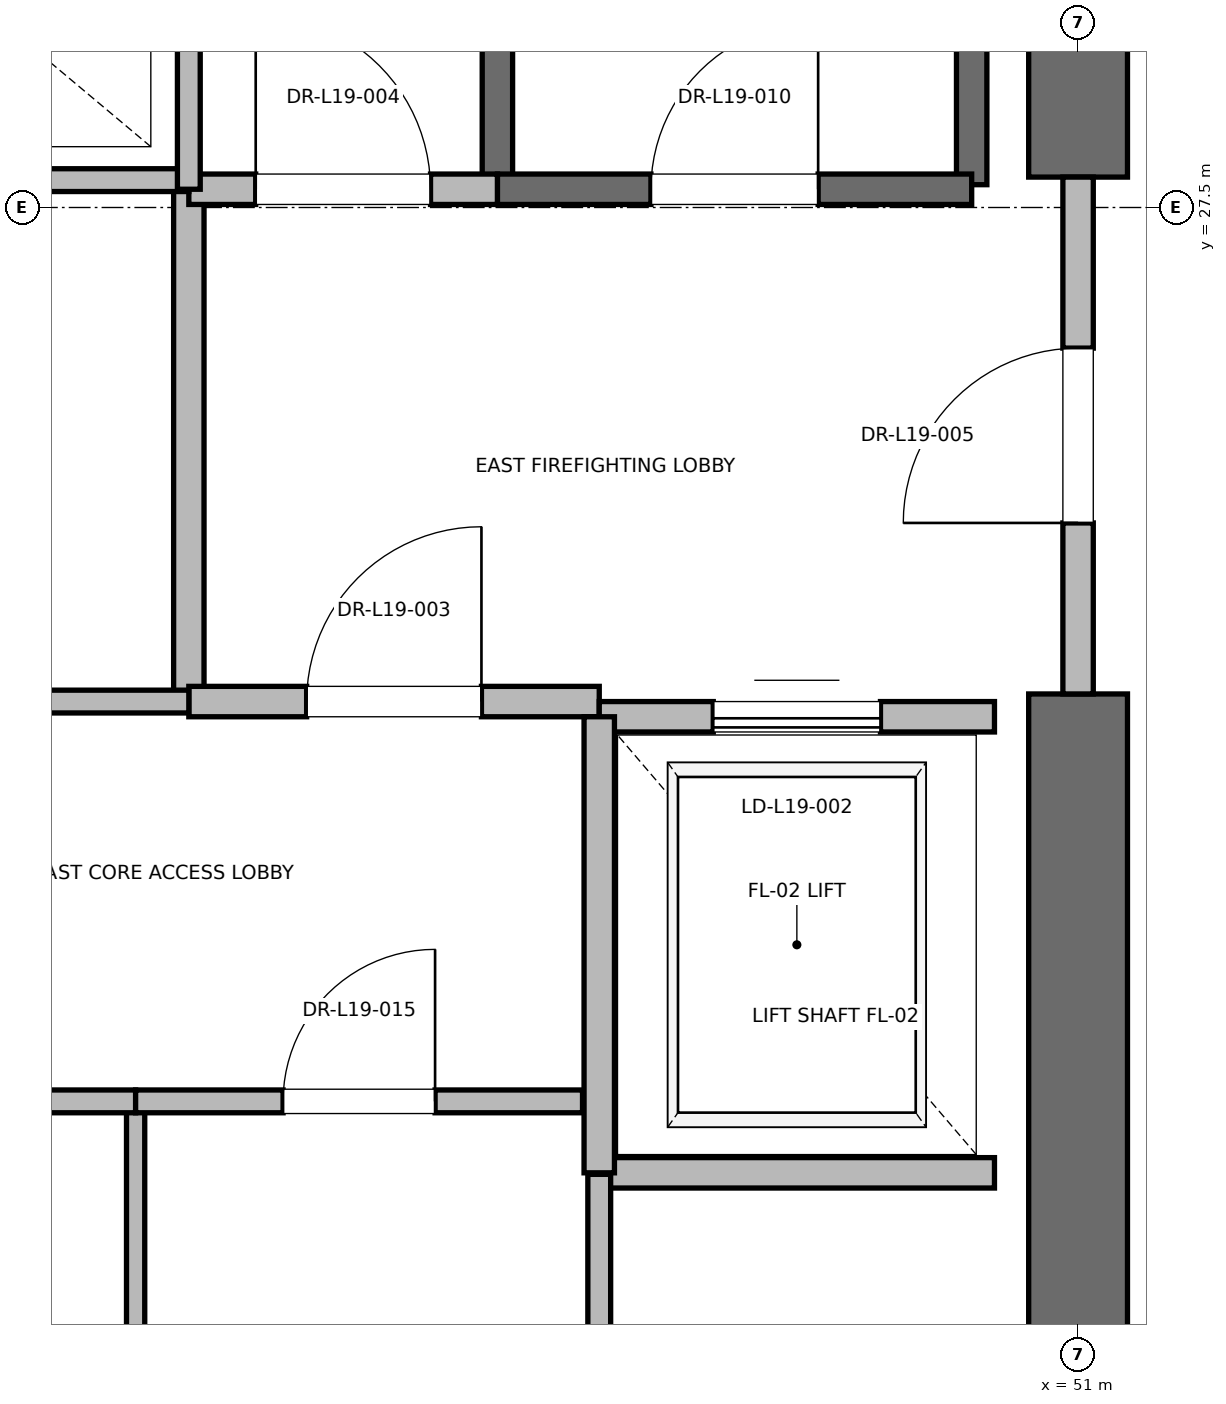
"""IFC4 building model, lengths in metres.
Left out: names, types, materials, properties, quantities, classifications, styles, units other than length and angle.
Written with IfcOpenShell. Run it as: python <this file> out.ifc"""

import sys

from ifc_helpers import new_model, si_unit, direction, frame, frame_2d, origin, place, context, subcontext, project, spatial, rectangle, extrude, element, fill, save


model = new_model("IFC4")
c1 = context("Model", 3, precision=1e-05, world=origin(), true_north=direction((0.0, 1.0)))
c2 = subcontext(c1, "Body", "Model", "MODEL_VIEW")
j1 = project(units=[si_unit("LENGTHUNIT", "METRE"), si_unit("PLANEANGLEUNIT", "RADIAN")], contexts=[c1])
p1 = place(None, origin())
s1 = spatial("IfcSite", under=j1, at=p1, CompositionType="ELEMENT")
p2 = place(p1, origin())
s2 = spatial("IfcBuilding", under=s1, at=p2, CompositionType="ELEMENT")
p3 = place(p2, frame((0.0, 0.0, 83.6)))
s3 = spatial("IfcBuildingStorey", under=s2, at=p3, CompositionType="ELEMENT", Elevation=83.6)
p4 = place(p3, frame((51.0, 18.5, 0.0), z_axis=(0.0, 0.0, 1.0), x_axis=(0.0, 1.0, 0.0)))
e1 = element("IfcWall", 1, at=p4, inside=s3, PredefinedType="SHEAR", context=c2, shape_type="SweptSolid", body=[
    extrude(rectangle(XDim=5.8, YDim=0.65, at=frame_2d((2.9, 0.0))), origin(), (0.0, 0.0, 1.0), 3.76),
])
p5 = place(p3, frame((51.0, 27.7, 0.0), z_axis=(0.0, 0.0, 1.0), x_axis=(0.0, 1.0, 0.0)))
e2 = element("IfcWall", 2, at=p5, inside=s3, PredefinedType="SHEAR", context=c2, shape_type="SweptSolid", body=[
    extrude(rectangle(XDim=8.8, YDim=0.65, at=frame_2d((4.4, 0.0))), origin(), (0.0, 0.0, 1.0), 3.76),
])
p6 = place(p3, frame((50.3, 27.65, 0.0), z_axis=(0.0, 0.0, 1.0), x_axis=(0.0, 1.0, 0.0)))
e3 = element("IfcWall", 3, at=p6, inside=s3, PredefinedType="SOLIDWALL", context=c2, shape_type="SweptSolid", body=[
    extrude(rectangle(XDim=8.15, YDim=0.2, at=frame_2d((4.075, 0.0))), origin(), (0.0, 0.0, 1.0), 3.76),
])
p7 = place(p3, frame((47.18, 27.62, 0.0), z_axis=(0.0, 0.0, 1.0), x_axis=(0.0, 1.0, 0.0)))
e4 = element("IfcWall", 4, at=p7, inside=s3, PredefinedType="SOLIDWALL", context=c2, shape_type="SweptSolid", body=[
    extrude(rectangle(XDim=8.18, YDim=0.2, at=frame_2d((4.09, 0.0))), origin(), (0.0, 0.0, 1.0), 3.76),
])
p8 = place(p3, frame((47.18, 27.62, 0.0), z_axis=(0.0, 0.0, 1.0), x_axis=(1.0, 0.0, 0.0)))
e5 = element("IfcWall", 5, at=p8, inside=s3, PredefinedType="SOLIDWALL", context=c2, shape_type="SweptSolid", body=[
    extrude(rectangle(XDim=3.12, YDim=0.2, at=frame_2d((1.56, 0.0))), origin(), (0.0, 0.0, 1.0), 3.76),
])
p9 = place(p8, frame((1.01, 0.0, 0.0)))
e6 = element("IfcOpeningElement", 6, at=p9, cuts=e5, PredefinedType="OPENING", context=c2, shape_type="SweptSolid", body=[
    extrude(rectangle(XDim=1.1, YDim=2.15, at=frame_2d((0.55, 1.075))), frame((0.0, 0.1, 0.0), z_axis=(0.0, -1.0, 0.0), x_axis=(1.0, 0.0, 0.0)), (0.0, 0.0, 1.0), 0.2),
])
p10 = place(p3, frame((45.15, 24.25, 0.0), z_axis=(0.0, 0.0, 1.0), x_axis=(0.0, 1.0, 0.0)))
e7 = element("IfcWall", 7, at=p10, inside=s3, PredefinedType="PARTITIONING", context=c2, shape_type="SweptSolid", body=[
    extrude(rectangle(XDim=3.37, YDim=0.2, at=frame_2d((1.685, 0.0))), origin(), (0.0, 0.0, 1.0), 3.76),
])
p11 = place(p3, frame((45.15, 24.25, 0.0), z_axis=(0.0, 0.0, 1.0), x_axis=(1.0, 0.0, 0.0)))
e8 = element("IfcWall", 8, at=p11, inside=s3, PredefinedType="PARTITIONING", context=c2, shape_type="SweptSolid", body=[
    extrude(rectangle(XDim=2.7, YDim=0.2, at=frame_2d((1.35, 0.0))), origin(), (0.0, 0.0, 1.0), 3.76),
])
p12 = place(p11, frame((0.775, 0.0, 0.0)))
e9 = element("IfcOpeningElement", 9, at=p12, cuts=e8, PredefinedType="OPENING", context=c2, shape_type="SweptSolid", body=[
    extrude(rectangle(XDim=1.15, YDim=2.2, at=frame_2d((0.575, 1.1))), frame((0.0, 0.1, 0.0), z_axis=(0.0, -1.0, 0.0), x_axis=(1.0, 0.0, 0.0)), (0.0, 0.0, 1.0), 0.2),
])
p13 = place(p3, frame((45.15, 27.62, 0.0), z_axis=(0.0, 0.0, 1.0), x_axis=(1.0, 0.0, 0.0)))
e10 = element("IfcWall", 10, at=p13, inside=s3, PredefinedType="PARTITIONING", context=c2, shape_type="SweptSolid", body=[
    extrude(rectangle(XDim=2.03, YDim=0.2, at=frame_2d((1.015, 0.0))), origin(), (0.0, 0.0, 1.0), 3.76),
])
p14 = place(p13, frame((0.44, 0.0, 0.0)))
e11 = element("IfcOpeningElement", 11, at=p14, cuts=e10, PredefinedType="OPENING", context=c2, shape_type="SweptSolid", body=[
    extrude(rectangle(XDim=1.15, YDim=2.2, at=frame_2d((0.575, 1.1))), frame((0.0, 0.1, 0.0), z_axis=(0.0, -1.0, 0.0), x_axis=(1.0, 0.0, 0.0)), (0.0, 0.0, 1.0), 0.2),
])
p15 = place(p3, frame((51.0, 24.3, 0.0), z_axis=(0.0, 0.0, 1.0), x_axis=(0.0, 1.0, 0.0)))
e12 = element("IfcWall", 12, at=p15, inside=s3, PredefinedType="PARTITIONING", context=c2, shape_type="SweptSolid", body=[
    extrude(rectangle(XDim=3.4, YDim=0.2, at=frame_2d((1.7, 0.0))), origin(), (0.0, 0.0, 1.0), 2.54),
])
p16 = place(p15, frame((1.125, 0.0, 0.0)))
e13 = element("IfcOpeningElement", 13, at=p16, cuts=e12, PredefinedType="OPENING", context=c2, shape_type="SweptSolid", body=[
    extrude(rectangle(XDim=1.15, YDim=2.2, at=frame_2d((0.575, 1.1))), frame((0.0, 0.1, 0.0), z_axis=(0.0, -1.0, 0.0), x_axis=(1.0, 0.0, 0.0)), (0.0, 0.0, 1.0), 0.2),
])
p17 = place(p3, frame((47.85, 21.15, 0.0), z_axis=(0.0, 0.0, 1.0), x_axis=(1.0, 0.0, 0.0)))
e14 = element("IfcWall", 14, at=p17, inside=s3, PredefinedType="SOLIDWALL", context=c2, shape_type="SweptSolid", body=[
    extrude(rectangle(XDim=2.6, YDim=0.2, at=frame_2d((1.3, 0.0))), origin(), (0.0, 0.0, 1.0), 3.76),
])
p18 = place(p3, frame((50.45, 24.15, 0.0), z_axis=(0.0, 0.0, 1.0), x_axis=(-1.0, 0.0, 0.0)))
e15 = element("IfcWall", 15, at=p18, inside=s3, PredefinedType="SOLIDWALL", context=c2, shape_type="SweptSolid", body=[
    extrude(rectangle(XDim=2.6, YDim=0.2, at=frame_2d((1.3, 0.0))), origin(), (0.0, 0.0, 1.0), 2.54),
])
p19 = place(p18, frame((0.75, 0.0, 0.0)))
e16 = element("IfcOpeningElement", 16, at=p19, cuts=e15, PredefinedType="OPENING", context=c2, shape_type="SweptSolid", body=[
    extrude(rectangle(XDim=1.1, YDim=2.2, at=frame_2d((0.55, 1.1))), frame((0.0, 0.1, 0.0), z_axis=(0.0, -1.0, 0.0), x_axis=(1.0, 0.0, 0.0)), (0.0, 0.0, 1.0), 0.2),
])
p20 = place(p3, frame((47.85, 24.15, 0.0), z_axis=(0.0, 0.0, 1.0), x_axis=(0.0, -1.0, 0.0)))
e17 = element("IfcWall", 17, at=p20, inside=s3, PredefinedType="SOLIDWALL", context=c2, shape_type="SweptSolid", body=[
    extrude(rectangle(XDim=3.0, YDim=0.2, at=frame_2d((1.5, 0.0))), origin(), (0.0, 0.0, 1.0), 3.76),
])
p21 = place(p3, frame((41.56, 27.68, 0.0), z_axis=(0.0, 0.0, 1.0), x_axis=(1.0, 0.0, 0.0)))
e18 = element("IfcWall", 18, at=p21, inside=s3, PredefinedType="PARTITIONING", context=c2, shape_type="SweptSolid", body=[
    extrude(rectangle(XDim=3.59, YDim=0.15, at=frame_2d((1.795, 0.0))), origin(), (0.0, 0.0, 1.0), 2.85),
])
p22 = place(p3, frame((47.85, 18.6, 0.0), z_axis=(0.0, 0.0, 1.0), x_axis=(0.0, 1.0, 0.0)))
e19 = element("IfcWall", 19, at=p22, inside=s3, PredefinedType="PARTITIONING", context=c2, shape_type="SweptSolid", body=[
    extrude(rectangle(XDim=2.54, YDim=0.15, at=frame_2d((1.27, 0.0))), origin(), (0.0, 0.0, 1.0), 2.85),
])
p23 = place(p3, frame((44.8, 18.6, 0.0), z_axis=(0.0, 0.0, 1.0), x_axis=(0.0, 1.0, 0.0)))
e20 = element("IfcWall", 20, at=p23, inside=s3, PredefinedType="PARTITIONING", context=c2, shape_type="SweptSolid", body=[
    extrude(rectangle(XDim=3.02, YDim=0.12, at=frame_2d((1.51, 0.0))), origin(), (0.0, 0.0, 1.0), 2.85),
])
p24 = place(p3, frame((41.76, 21.62, 0.0), z_axis=(0.0, 0.0, 1.0), x_axis=(1.0, 0.0, 0.0)))
e21 = element("IfcWall", 21, at=p24, inside=s3, PredefinedType="PARTITIONING", context=c2, shape_type="SweptSolid", body=[
    extrude(rectangle(XDim=3.04, YDim=0.15, at=frame_2d((1.52, 0.0))), origin(), (0.0, 0.0, 1.0), 2.85),
])
p25 = place(p24, frame((1.02, 0.0, 0.0)))
e22 = element("IfcOpeningElement", 22, at=p25, cuts=e21, PredefinedType="OPENING", context=c2, shape_type="SweptSolid", body=[
    extrude(rectangle(XDim=1.0, YDim=2.15, at=frame_2d((0.5, 1.075))), frame((0.0, 0.075, 0.0), z_axis=(0.0, -1.0, 0.0), x_axis=(1.0, 0.0, 0.0)), (0.0, 0.0, 1.0), 0.15),
])
p26 = place(p3, frame((44.8, 21.62, 0.0), z_axis=(0.0, 0.0, 1.0), x_axis=(1.0, 0.0, 0.0)))
e23 = element("IfcWall", 23, at=p26, inside=s3, PredefinedType="PARTITIONING", context=c2, shape_type="SweptSolid", body=[
    extrude(rectangle(XDim=2.94, YDim=0.15, at=frame_2d((1.47, 0.0))), origin(), (0.0, 0.0, 1.0), 2.85),
])
p27 = place(p26, frame((0.97, 0.0, 0.0)))
e24 = element("IfcOpeningElement", 24, at=p27, cuts=e23, PredefinedType="OPENING", context=c2, shape_type="SweptSolid", body=[
    extrude(rectangle(XDim=1.0, YDim=2.15, at=frame_2d((0.5, 1.075))), frame((0.0, 0.075, 0.0), z_axis=(0.0, -1.0, 0.0), x_axis=(1.0, 0.0, 0.0)), (0.0, 0.0, 1.0), 0.15),
])
p28 = place(p3, frame((41.76, 24.25, 0.0), z_axis=(0.0, 0.0, 1.0), x_axis=(1.0, 0.0, 0.0)))
e25 = element("IfcWall", 25, at=p28, inside=s3, PredefinedType="PARTITIONING", context=c2, shape_type="SweptSolid", body=[
    extrude(rectangle(XDim=3.39, YDim=0.15, at=frame_2d((1.695, 0.0))), origin(), (0.0, 0.0, 1.0), 2.85),
])
p29 = place(p28, frame((1.255, 0.0, 0.0)))
e26 = element("IfcOpeningElement", 26, at=p29, cuts=e25, PredefinedType="OPENING", context=c2, shape_type="SweptSolid", body=[
    extrude(rectangle(XDim=0.88, YDim=2.1, at=frame_2d((0.44, 1.05))), frame((0.0, 0.075, 0.0), z_axis=(0.0, -1.0, 0.0), x_axis=(1.0, 0.0, 0.0)), (0.0, 0.0, 1.0), 0.15),
])
p30 = place(p3, frame((45.15, 27.62, 0.0), z_axis=(0.0, 0.0, 1.0), x_axis=(0.0, 1.0, 0.0)))
e27 = element("IfcWall", 27, at=p30, inside=s3, PredefinedType="PARTITIONING", context=c2, shape_type="SweptSolid", body=[
    extrude(rectangle(XDim=3.1, YDim=0.15, at=frame_2d((1.55, 0.0))), origin(), (0.0, 0.0, 1.0), 2.85),
])
p31 = place(p9, origin())
e28 = element("IfcDoor", 28, at=p31, inside=s3, OperationType="SINGLE_SWING_RIGHT", PredefinedType="DOOR", context=c2, shape_type="SweptSolid", body=[
    extrude(rectangle(XDim=1.1, YDim=2.15, at=frame_2d((0.55, 1.075))), frame((0.0, 0.025, 0.0), z_axis=(0.0, -1.0, 0.0), x_axis=(1.0, 0.0, 0.0)), (0.0, 0.0, 1.0), 0.05),
])
fill(e6, e28)
p32 = place(p12, origin())
e29 = element("IfcDoor", 29, at=p32, inside=s3, OperationType="SINGLE_SWING_RIGHT", PredefinedType="DOOR", context=c2, shape_type="SweptSolid", body=[
    extrude(rectangle(XDim=1.15, YDim=2.2, at=frame_2d((0.575, 1.1))), frame((0.0, 0.025, 0.0), z_axis=(0.0, -1.0, 0.0), x_axis=(1.0, 0.0, 0.0)), (0.0, 0.0, 1.0), 0.05),
])
fill(e9, e29)
p33 = place(p14, origin())
e30 = element("IfcDoor", 30, at=p33, inside=s3, OperationType="SINGLE_SWING_LEFT", PredefinedType="DOOR", context=c2, shape_type="SweptSolid", body=[
    extrude(rectangle(XDim=1.15, YDim=2.2, at=frame_2d((0.575, 1.1))), frame((0.0, 0.025, 0.0), z_axis=(0.0, -1.0, 0.0), x_axis=(1.0, 0.0, 0.0)), (0.0, 0.0, 1.0), 0.05),
])
fill(e11, e30)
p34 = place(p16, origin())
e31 = element("IfcDoor", 31, at=p34, inside=s3, OperationType="SINGLE_SWING_LEFT", PredefinedType="DOOR", context=c2, shape_type="SweptSolid", body=[
    extrude(rectangle(XDim=1.15, YDim=2.2, at=frame_2d((0.575, 1.1))), frame((0.0, 0.025, 0.0), z_axis=(0.0, -1.0, 0.0), x_axis=(1.0, 0.0, 0.0)), (0.0, 0.0, 1.0), 0.05),
])
fill(e13, e31)
p35 = place(p19, origin())
e32 = element("IfcDoor", 32, at=p35, inside=s3, OperationType="SLIDING_TO_RIGHT", PredefinedType="DOOR", context=c2, shape_type="SweptSolid", body=[
    extrude(rectangle(XDim=1.1, YDim=2.2, at=frame_2d((0.55, 1.1))), frame((0.0, 0.025, 0.0), z_axis=(0.0, -1.0, 0.0), x_axis=(1.0, 0.0, 0.0)), (0.0, 0.0, 1.0), 0.05),
])
fill(e16, e32)
p36 = place(p27, origin())
e33 = element("IfcDoor", 33, at=p36, inside=s3, OperationType="SINGLE_SWING_RIGHT", PredefinedType="DOOR", context=c2, shape_type="SweptSolid", body=[
    extrude(rectangle(XDim=1.0, YDim=2.15, at=frame_2d((0.5, 1.075))), frame((0.0, 0.025, 0.0), z_axis=(0.0, -1.0, 0.0), x_axis=(1.0, 0.0, 0.0)), (0.0, 0.0, 1.0), 0.05),
])
fill(e24, e33)
save(model, sys.argv[1])
